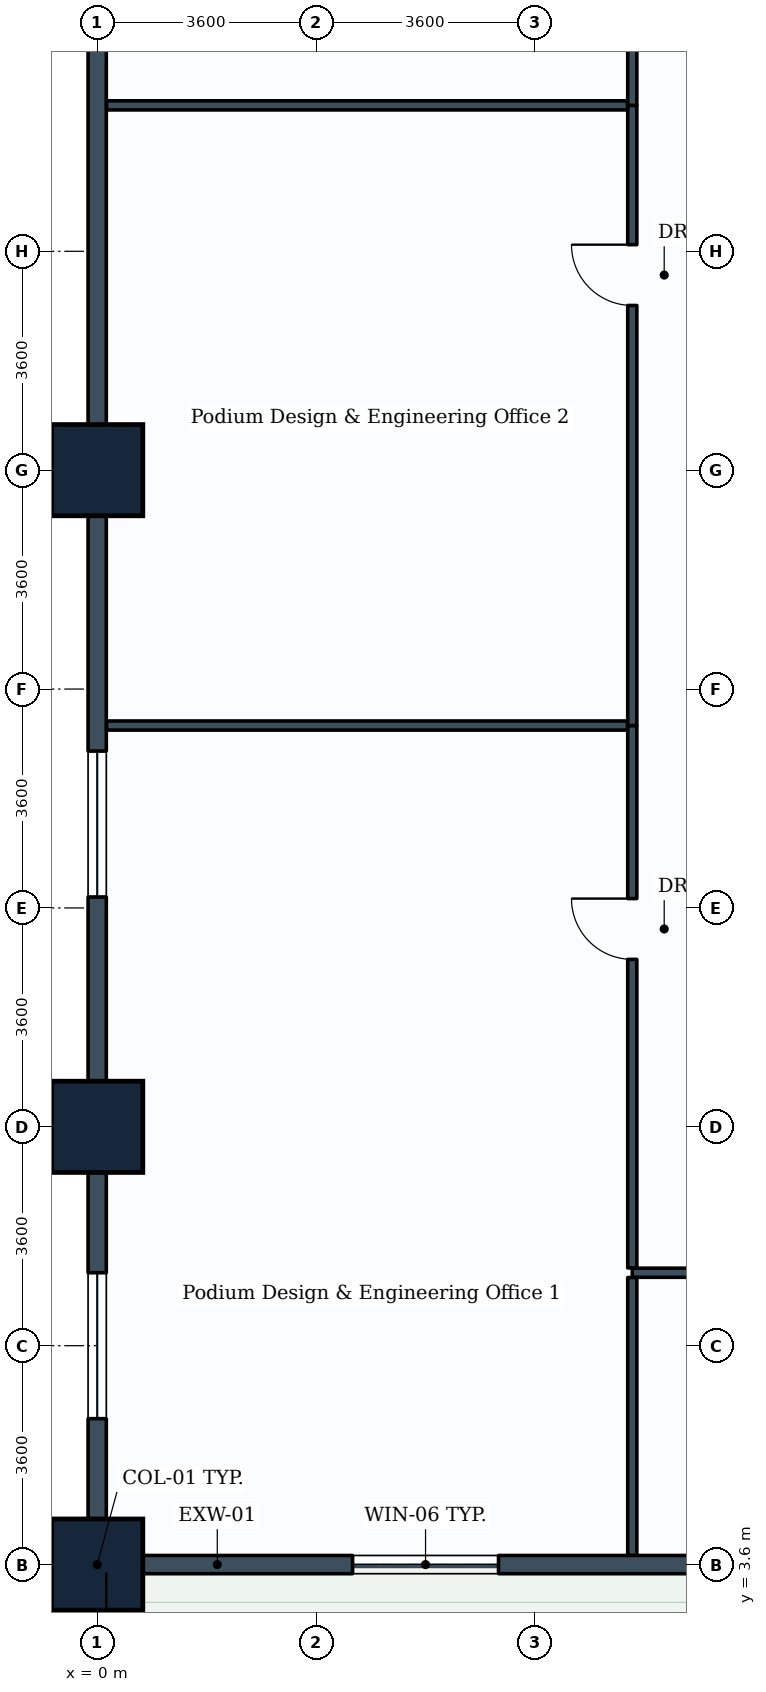
"""IFC4 building model, lengths in metres.
Left out: names, types, materials, properties, quantities, classifications, styles, units other than length and angle.
Written with IfcOpenShell. Run it as: python <this file> out.ifc"""

import sys

from ifc_helpers import new_model, si_unit, direction, frame, frame_2d, origin, origin_2d, place, context, subcontext, project, spatial, rectangle, extrude, element, fill, save


model = new_model("IFC4")
c1 = context("Model", 3, precision=1e-05, world=origin(), true_north=direction((0.0, 1.0)))
c2 = subcontext(c1, "Body", "Model", "MODEL_VIEW")
j1 = project(units=[si_unit("LENGTHUNIT", "METRE"), si_unit("PLANEANGLEUNIT", "RADIAN")], contexts=[c1])
p1 = place(None, origin())
s1 = spatial("IfcSite", under=j1, at=p1, CompositionType="ELEMENT")
p2 = place(p1, origin())
s2 = spatial("IfcBuilding", under=s1, at=p2, CompositionType="ELEMENT")
p3 = place(p2, frame((0.0, 0.0, 14.8)))
s3 = spatial("IfcBuildingStorey", under=s2, at=p3, CompositionType="ELEMENT", Elevation=14.8)
for number, where, z_axis, x_axis in (
    (1, (0.0, 3.6, 0.0), (0.0, 0.0, 1.0), (1.0, 0.0, 0.0)),
    (2, (0.0, 10.8, 0.0), (0.0, 0.0, 1.0), (1.0, 0.0, 0.0)),
    (3, (0.0, 21.6, 0.0), (0.0, 0.0, 1.0), (1.0, 0.0, 0.0)),
):
    element("IfcColumn", number, at=place(p3, frame(where, z_axis=z_axis, x_axis=x_axis)), inside=s3, PredefinedType="COLUMN", context=c2, shape_type="SweptSolid", body=[
        extrude(rectangle(XDim=1.5, YDim=1.5, at=origin_2d()), origin(), (0.0, 0.0, 1.0), 4.6),
    ])
p4 = place(p3, frame((10.8, 3.6, 0.0), z_axis=(0.0, 0.0, 1.0), x_axis=(-1.0, 0.0, 0.0)))
e4 = element("IfcWall", 4, at=p4, inside=s3, PredefinedType="STANDARD", context=c2, shape_type="SweptSolid", body=[
    extrude(rectangle(XDim=10.8, YDim=0.3, at=frame_2d((5.4, 0.0))), origin(), (0.0, 0.0, 1.0), 3.63),
])
p5 = place(p4, frame((4.2, 0.0, 0.85)))
e5 = element("IfcOpeningElement", 5, at=p5, cuts=e4, PredefinedType="OPENING", context=c2, shape_type="SweptSolid", body=[
    extrude(rectangle(XDim=2.4, YDim=1.6, at=frame_2d((1.2, 0.8))), frame((0.0, 0.16, 0.0), z_axis=(0.0, -1.0, 0.0), x_axis=(1.0, 0.0, 0.0)), (0.0, 0.0, 1.0), 0.32),
])
p6 = place(p3, frame((0.0, 3.6, 0.0), z_axis=(0.0, 0.0, 1.0), x_axis=(0.0, 1.0, 0.0)))
e6 = element("IfcWall", 6, at=p6, inside=s3, PredefinedType="STANDARD", context=c2, shape_type="SweptSolid", body=[
    extrude(rectangle(XDim=7.2, YDim=0.3, at=frame_2d((3.6, 0.0))), origin(), (0.0, 0.0, 1.0), 3.63),
])
p7 = place(p6, frame((2.4, 0.0, 0.85)))
e7 = element("IfcOpeningElement", 7, at=p7, cuts=e6, PredefinedType="OPENING", context=c2, shape_type="SweptSolid", body=[
    extrude(rectangle(XDim=2.4, YDim=1.6, at=frame_2d((1.2, 0.8))), frame((0.0, 0.16, 0.0), z_axis=(0.0, -1.0, 0.0), x_axis=(1.0, 0.0, 0.0)), (0.0, 0.0, 1.0), 0.32),
])
p8 = place(p3, frame((0.0, 10.8, 0.0), z_axis=(0.0, 0.0, 1.0), x_axis=(0.0, 1.0, 0.0)))
e8 = element("IfcWall", 8, at=p8, inside=s3, PredefinedType="STANDARD", context=c2, shape_type="SweptSolid", body=[
    extrude(rectangle(XDim=10.8, YDim=0.3, at=frame_2d((5.4, 0.0))), origin(), (0.0, 0.0, 1.0), 3.63),
])
p9 = place(p8, frame((3.78, 0.0, 0.85)))
e9 = element("IfcOpeningElement", 9, at=p9, cuts=e8, PredefinedType="OPENING", context=c2, shape_type="SweptSolid", body=[
    extrude(rectangle(XDim=2.4, YDim=1.6, at=frame_2d((1.2, 0.8))), frame((0.0, 0.16, 0.0), z_axis=(0.0, -1.0, 0.0), x_axis=(1.0, 0.0, 0.0)), (0.0, 0.0, 1.0), 0.32),
])
p10 = place(p3, frame((0.0, 21.6, 0.0), z_axis=(0.0, 0.0, 1.0), x_axis=(0.0, 1.0, 0.0)))
e10 = element("IfcWall", 10, at=p10, inside=s3, PredefinedType="STANDARD", context=c2, shape_type="SweptSolid", body=[
    extrude(rectangle(XDim=10.8, YDim=0.3, at=frame_2d((5.4, 0.0))), origin(), (0.0, 0.0, 1.0), 3.63),
])
p11 = place(p3, frame((8.8, 8.4, 0.0), z_axis=(0.0, 0.0, 1.0), x_axis=(1.0, 0.0, 0.0)))
e11 = element("IfcWall", 11, at=p11, inside=s3, PredefinedType="PARTITIONING", context=c2, shape_type="SweptSolid", body=[
    extrude(rectangle(XDim=15.2, YDim=0.15, at=frame_2d((7.6, 0.0))), origin(), (0.0, 0.0, 1.0), 3.63),
])
p12 = place(p11, frame((7.558, 0.0, 0.0)))
e12 = element("IfcOpeningElement", 12, at=p12, cuts=e11, PredefinedType="OPENING", context=c2, shape_type="SweptSolid", body=[
    extrude(rectangle(XDim=1.6, YDim=2.2, at=frame_2d((0.8, 1.1))), frame((0.0, 0.085, 0.0), z_axis=(0.0, -1.0, 0.0), x_axis=(1.0, 0.0, 0.0)), (0.0, 0.0, 1.0), 0.17),
])
p13 = place(p3, frame((8.8, 3.754, 0.0), z_axis=(0.0, 0.0, 1.0), x_axis=(0.0, 1.0, 0.0)))
e13 = element("IfcWall", 13, at=p13, inside=s3, PredefinedType="PARTITIONING", context=c2, shape_type="SweptSolid", body=[
    extrude(rectangle(XDim=4.567, YDim=0.15, at=frame_2d((2.284, 0.0))), origin(), (0.0, 0.0, 1.0), 4.285),
])
p14 = place(p3, frame((8.8, 8.479, 0.0), z_axis=(0.0, 0.0, 1.0), x_axis=(0.0, 1.0, 0.0)))
e14 = element("IfcWall", 14, at=p14, inside=s3, PredefinedType="PARTITIONING", context=c2, shape_type="SweptSolid", body=[
    extrude(rectangle(XDim=8.921, YDim=0.15, at=frame_2d((4.46, 0.0))), origin(), (0.0, 0.0, 1.0), 3.63),
])
p15 = place(p14, frame((5.075, 0.0, 0.0)))
e15 = element("IfcOpeningElement", 15, at=p15, cuts=e14, PredefinedType="OPENING", context=c2, shape_type="SweptSolid", body=[
    extrude(rectangle(XDim=1.0, YDim=2.1, at=frame_2d((0.5, 1.05))), frame((0.0, 0.085, 0.0), z_axis=(0.0, -1.0, 0.0), x_axis=(1.0, 0.0, 0.0)), (0.0, 0.0, 1.0), 0.17),
])
p16 = place(p3, frame((0.154, 17.4, 0.0), z_axis=(0.0, 0.0, 1.0), x_axis=(1.0, 0.0, 0.0)))
e16 = element("IfcWall", 16, at=p16, inside=s3, PredefinedType="PARTITIONING", context=c2, shape_type="SweptSolid", body=[
    extrude(rectangle(XDim=8.567, YDim=0.15, at=frame_2d((4.283, 0.0))), origin(), (0.0, 0.0, 1.0), 3.83),
])
p17 = place(p3, frame((8.8, 17.4, 0.0), z_axis=(0.0, 0.0, 1.0), x_axis=(0.0, 1.0, 0.0)))
e17 = element("IfcWall", 17, at=p17, inside=s3, PredefinedType="PARTITIONING", context=c2, shape_type="SweptSolid", body=[
    extrude(rectangle(XDim=10.2, YDim=0.15, at=frame_2d((5.1, 0.0))), origin(), (0.0, 0.0, 1.0), 3.63),
])
p18 = place(p17, frame((6.909, 0.0, 0.0)))
e18 = element("IfcOpeningElement", 18, at=p18, cuts=e17, PredefinedType="OPENING", context=c2, shape_type="SweptSolid", body=[
    extrude(rectangle(XDim=1.0, YDim=2.1, at=frame_2d((0.5, 1.05))), frame((0.0, 0.085, 0.0), z_axis=(0.0, -1.0, 0.0), x_axis=(1.0, 0.0, 0.0)), (0.0, 0.0, 1.0), 0.17),
])
p19 = place(p3, frame((0.154, 27.6, 0.0), z_axis=(0.0, 0.0, 1.0), x_axis=(1.0, 0.0, 0.0)))
e19 = element("IfcWall", 19, at=p19, inside=s3, PredefinedType="PARTITIONING", context=c2, shape_type="SweptSolid", body=[
    extrude(rectangle(XDim=8.567, YDim=0.15, at=frame_2d((4.283, 0.0))), origin(), (0.0, 0.0, 1.0), 3.83),
])
p20 = place(p3, frame((8.8, 27.6, 0.0), z_axis=(0.0, 0.0, 1.0), x_axis=(0.0, 1.0, 0.0)))
e20 = element("IfcWall", 20, at=p20, inside=s3, PredefinedType="PARTITIONING", context=c2, shape_type="SweptSolid", body=[
    extrude(rectangle(XDim=7.8, YDim=0.15, at=frame_2d((3.9, 0.0))), origin(), (0.0, 0.0, 1.0), 3.63),
])
p21 = place(p20, frame((1.095, 0.0, 0.0)))
e21 = element("IfcOpeningElement", 21, at=p21, cuts=e20, PredefinedType="OPENING", context=c2, shape_type="SweptSolid", body=[
    extrude(rectangle(XDim=1.0, YDim=2.1, at=frame_2d((0.5, 1.05))), frame((0.0, 0.085, 0.0), z_axis=(0.0, -1.0, 0.0), x_axis=(1.0, 0.0, 0.0)), (0.0, 0.0, 1.0), 0.17),
])
p22 = place(p5, origin())
e22 = element("IfcWindow", 22, at=p22, inside=s3, PartitioningType="SINGLE_PANEL", PredefinedType="WINDOW", context=c2, shape_type="SweptSolid", body=[
    extrude(rectangle(XDim=2.4, YDim=1.6, at=frame_2d((1.2, 0.8))), frame((0.0, 0.03, 0.0), z_axis=(0.0, -1.0, 0.0), x_axis=(1.0, 0.0, 0.0)), (0.0, 0.0, 1.0), 0.06),
])
fill(e5, e22)
p23 = place(p7, origin())
e23 = element("IfcWindow", 23, at=p23, inside=s3, PartitioningType="SINGLE_PANEL", PredefinedType="WINDOW", context=c2, shape_type="SweptSolid", body=[
    extrude(rectangle(XDim=2.4, YDim=1.6, at=frame_2d((1.2, 0.8))), frame((0.0, 0.03, 0.0), z_axis=(0.0, -1.0, 0.0), x_axis=(1.0, 0.0, 0.0)), (0.0, 0.0, 1.0), 0.06),
])
fill(e7, e23)
p24 = place(p9, origin())
e24 = element("IfcWindow", 24, at=p24, inside=s3, PartitioningType="SINGLE_PANEL", PredefinedType="WINDOW", context=c2, shape_type="SweptSolid", body=[
    extrude(rectangle(XDim=2.4, YDim=1.6, at=frame_2d((1.2, 0.8))), frame((0.0, 0.03, 0.0), z_axis=(0.0, -1.0, 0.0), x_axis=(1.0, 0.0, 0.0)), (0.0, 0.0, 1.0), 0.06),
])
fill(e9, e24)
p25 = place(p15, origin())
e25 = element("IfcDoor", 25, at=p25, inside=s3, OperationType="SINGLE_SWING_RIGHT", PredefinedType="DOOR", context=c2, shape_type="SweptSolid", body=[
    extrude(rectangle(XDim=1.0, YDim=2.1, at=frame_2d((0.5, 1.05))), frame((0.0, 0.025, 0.0), z_axis=(0.0, -1.0, 0.0), x_axis=(1.0, 0.0, 0.0)), (0.0, 0.0, 1.0), 0.05),
])
fill(e15, e25)
p26 = place(p18, origin())
e26 = element("IfcDoor", 26, at=p26, inside=s3, OperationType="SINGLE_SWING_RIGHT", PredefinedType="DOOR", context=c2, shape_type="SweptSolid", body=[
    extrude(rectangle(XDim=1.0, YDim=2.1, at=frame_2d((0.5, 1.05))), frame((0.0, 0.025, 0.0), z_axis=(0.0, -1.0, 0.0), x_axis=(1.0, 0.0, 0.0)), (0.0, 0.0, 1.0), 0.05),
])
fill(e18, e26)
save(model, sys.argv[1])
